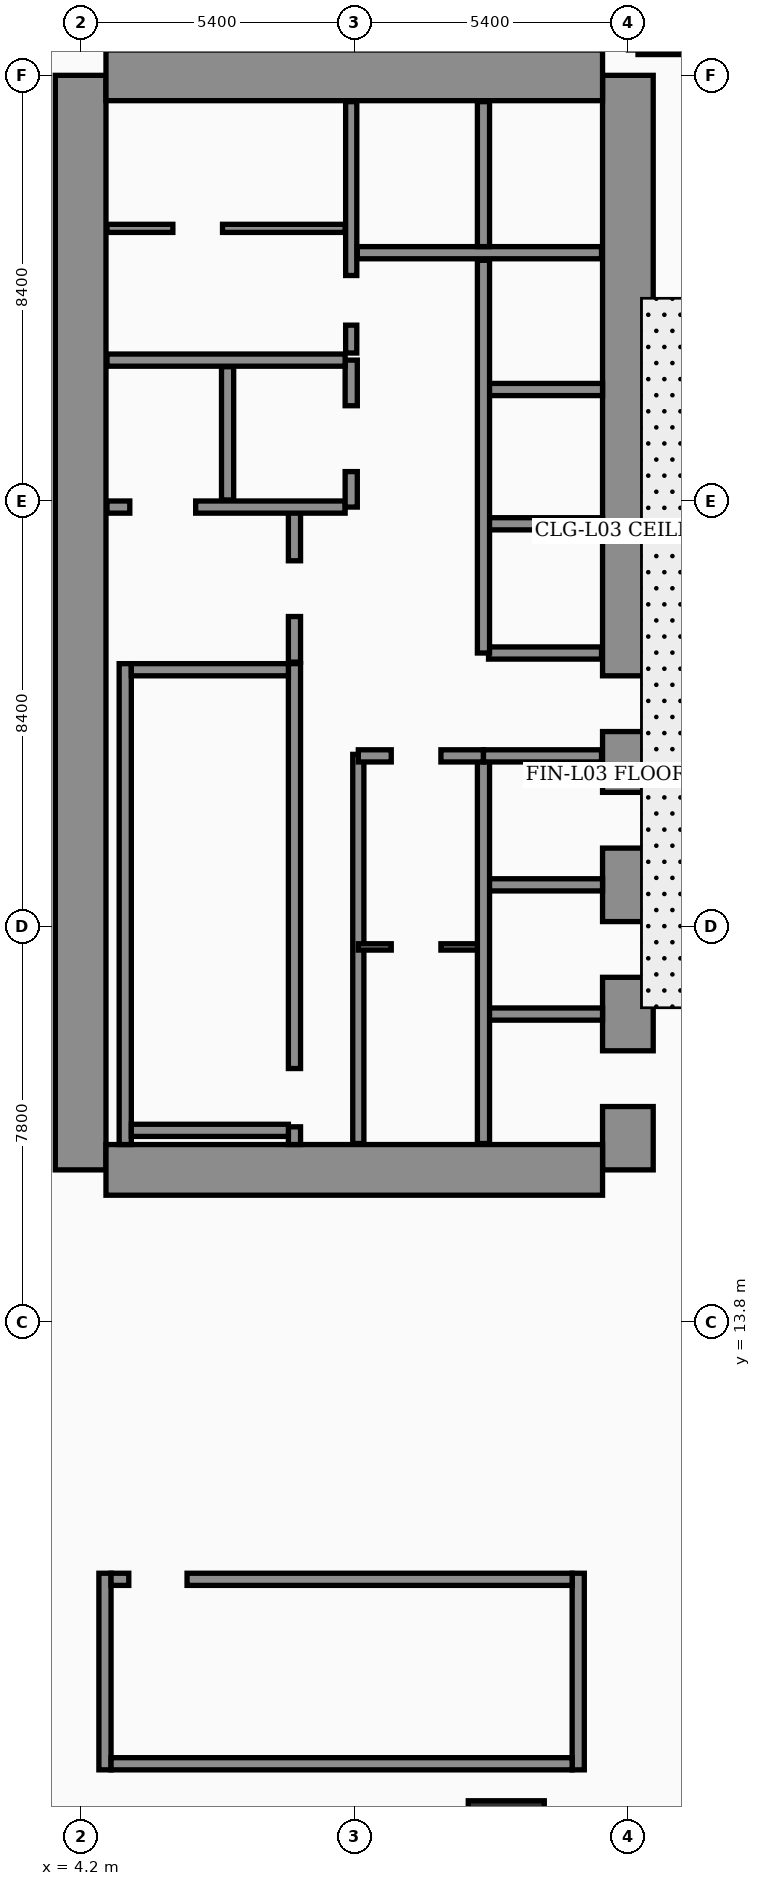
"""IFC4 building model, lengths in metres.
Left out: names, types, materials, properties, quantities, classifications, styles, units other than length and angle.
Written with IfcOpenShell. Run it as: python <this file> out.ifc"""

import sys

from ifc_helpers import new_model, si_unit, direction, frame, frame_2d, origin, origin_2d, place, context, subcontext, project, spatial, rectangle, extrude, element, fill, save


model = new_model("IFC4")
c1 = context("Model", 3, precision=1e-05, world=origin(), true_north=direction((0.0, 1.0)))
c2 = subcontext(c1, "Body", "Model", "MODEL_VIEW")
j1 = project(units=[si_unit("LENGTHUNIT", "METRE"), si_unit("PLANEANGLEUNIT", "RADIAN")], contexts=[c1])
p1 = place(None, origin())
s1 = spatial("IfcSite", under=j1, at=p1, CompositionType="ELEMENT")
p2 = place(p1, origin())
s2 = spatial("IfcBuilding", under=s1, at=p2, CompositionType="ELEMENT")
p3 = place(p2, frame((0.0, 0.0, 17.0)))
s3 = spatial("IfcBuildingStorey", under=s2, at=p3, CompositionType="ELEMENT", Elevation=17.0)
p4 = place(p3, frame((4.2, 16.8, 0.0), z_axis=(0.0, 0.0, 1.0), x_axis=(0.0, 1.0, 0.0)))
e1 = element("IfcWall", 1, at=p4, inside=s3, PredefinedType="SHEAR", context=c2, shape_type="SweptSolid", body=[
    extrude(rectangle(XDim=21.6, YDim=1.0, at=frame_2d((10.8, 0.0))), origin(), (0.0, 0.0, 1.0), 4.55),
])
p5 = place(p3, frame((15.0, 16.8, 0.0), z_axis=(0.0, 0.0, 1.0), x_axis=(0.0, 1.0, 0.0)))
e2 = element("IfcWall", 2, at=p5, inside=s3, PredefinedType="SHEAR", context=c2, shape_type="SweptSolid", body=[
    extrude(rectangle(XDim=21.6, YDim=1.0, at=frame_2d((10.8, 0.0))), origin(), (0.0, 0.0, 1.0), 4.55),
])
p6 = place(p5, frame((8.65, 0.0, 0.0)))
e3 = element("IfcOpeningElement", 3, at=p6, cuts=e2, PredefinedType="OPENING", context=c2, shape_type="SweptSolid", body=[
    extrude(rectangle(XDim=1.1, YDim=2.2, at=frame_2d((0.55, 1.1))), frame((0.0, 0.51, 0.0), z_axis=(0.0, -1.0, 0.0), x_axis=(1.0, 0.0, 0.0)), (0.0, 0.0, 1.0), 1.02),
])
p7 = place(p5, frame((1.25, 0.0, 0.0)))
e4 = element("IfcOpeningElement", 4, at=p7, cuts=e2, PredefinedType="OPENING", context=c2, shape_type="SweptSolid", body=[
    extrude(rectangle(XDim=1.1, YDim=2.2, at=frame_2d((0.55, 1.1))), frame((0.0, 0.51, 0.0), z_axis=(0.0, -1.0, 0.0), x_axis=(1.0, 0.0, 0.0)), (0.0, 0.0, 1.0), 1.02),
])
p8 = place(p5, frame((3.8, 0.0, 0.0)))
e5 = element("IfcOpeningElement", 5, at=p8, cuts=e2, PredefinedType="OPENING", context=c2, shape_type="SweptSolid", body=[
    extrude(rectangle(XDim=1.1, YDim=2.2, at=frame_2d((0.55, 1.1))), frame((0.0, 0.51, 0.0), z_axis=(0.0, -1.0, 0.0), x_axis=(1.0, 0.0, 0.0)), (0.0, 0.0, 1.0), 1.02),
])
p9 = place(p5, frame((6.35, 0.0, 0.0)))
e6 = element("IfcOpeningElement", 6, at=p9, cuts=e2, PredefinedType="OPENING", context=c2, shape_type="SweptSolid", body=[
    extrude(rectangle(XDim=1.1, YDim=2.2, at=frame_2d((0.55, 1.1))), frame((0.0, 0.51, 0.0), z_axis=(0.0, -1.0, 0.0), x_axis=(1.0, 0.0, 0.0)), (0.0, 0.0, 1.0), 1.02),
])
for number, where, z_axis, x_axis in (
    (7, (4.7, 38.4, 0.0), (0.0, 0.0, 1.0), (1.0, 0.0, 0.0)),
    (8, (4.7, 16.8, 0.0), (0.0, 0.0, 1.0), (1.0, 0.0, 0.0)),
):
    element("IfcWall", number, at=place(p3, frame(where, z_axis=z_axis, x_axis=x_axis)), inside=s3, PredefinedType="SHEAR", context=c2, shape_type="SweptSolid", body=[
        extrude(rectangle(XDim=9.8, YDim=1.0, at=frame_2d((4.9, 0.0))), origin(), (0.0, 0.0, 1.0), 4.55),
    ])
p10 = place(p3, frame((5.08, 17.3, 0.0), z_axis=(0.0, 0.0, 1.0), x_axis=(0.0, 1.0, 0.0)))
e9 = element("IfcWall", 9, at=p10, inside=s3, PredefinedType="SOLIDWALL", context=c2, shape_type="SweptSolid", body=[
    extrude(rectangle(XDim=9.49, YDim=0.24, at=frame_2d((4.745, 0.0))), origin(), (0.0, 0.0, 1.0), 4.55),
])
p11 = place(p3, frame((8.42, 17.3, 0.0), z_axis=(0.0, 0.0, 1.0), x_axis=(0.0, 1.0, 0.0)))
e10 = element("IfcWall", 10, at=p11, inside=s3, PredefinedType="SOLIDWALL", context=c2, shape_type="SweptSolid", body=[
    extrude(rectangle(XDim=9.49, YDim=0.24, at=frame_2d((4.745, 0.0))), origin(), (0.0, 0.0, 1.0), 4.55),
])
p12 = place(p11, frame((0.35, 0.0, 0.0)))
e11 = element("IfcOpeningElement", 11, at=p12, cuts=e10, PredefinedType="OPENING", context=c2, shape_type="SweptSolid", body=[
    extrude(rectangle(XDim=1.15, YDim=2.2, at=frame_2d((0.575, 1.1))), frame((0.0, 0.13, 0.0), z_axis=(0.0, -1.0, 0.0), x_axis=(1.0, 0.0, 0.0)), (0.0, 0.0, 1.0), 0.26),
])
for number, where, z_axis, x_axis in (
    (12, (5.2, 17.58, 0.0), (0.0, 0.0, 1.0), (1.0, 0.0, 0.0)),
    (13, (5.2, 26.67, 0.0), (0.0, 0.0, 1.0), (1.0, 0.0, 0.0)),
):
    element("IfcWall", number, at=place(p3, frame(where, z_axis=z_axis, x_axis=x_axis)), inside=s3, PredefinedType="SOLIDWALL", context=c2, shape_type="SweptSolid", body=[
        extrude(rectangle(XDim=3.1, YDim=0.24, at=frame_2d((1.55, 0.0))), origin(), (0.0, 0.0, 1.0), 4.55),
    ])
for number, where, z_axis, x_axis in (
    (14, (4.68, 4.96, 0.0), (0.0, 0.0, 1.0), (0.0, 1.0, 0.0)),
    (15, (14.02, 4.96, 0.0), (0.0, 0.0, 1.0), (0.0, 1.0, 0.0)),
):
    element("IfcWall", number, at=place(p3, frame(where, z_axis=z_axis, x_axis=x_axis)), inside=s3, PredefinedType="SOLIDWALL", context=c2, shape_type="SweptSolid", body=[
        extrude(rectangle(XDim=3.88, YDim=0.24, at=frame_2d((1.94, 0.0))), origin(), (0.0, 0.0, 1.0), 4.55),
    ])
p13 = place(p3, frame((4.8, 5.08, 0.0), z_axis=(0.0, 0.0, 1.0), x_axis=(1.0, 0.0, 0.0)))
e16 = element("IfcWall", 16, at=p13, inside=s3, PredefinedType="SOLIDWALL", context=c2, shape_type="SweptSolid", body=[
    extrude(rectangle(XDim=9.1, YDim=0.24, at=frame_2d((4.55, 0.0))), origin(), (0.0, 0.0, 1.0), 4.55),
])
p14 = place(p3, frame((4.8, 8.72, 0.0), z_axis=(0.0, 0.0, 1.0), x_axis=(1.0, 0.0, 0.0)))
e17 = element("IfcWall", 17, at=p14, inside=s3, PredefinedType="SOLIDWALL", context=c2, shape_type="SweptSolid", body=[
    extrude(rectangle(XDim=9.1, YDim=0.24, at=frame_2d((4.55, 0.0))), origin(), (0.0, 0.0, 1.0), 4.55),
])
p15 = place(p14, frame((0.35, 0.0, 0.0)))
e18 = element("IfcOpeningElement", 18, at=p15, cuts=e17, PredefinedType="OPENING", context=c2, shape_type="SweptSolid", body=[
    extrude(rectangle(XDim=1.15, YDim=2.2, at=frame_2d((0.575, 1.1))), frame((0.0, 0.13, 0.0), z_axis=(0.0, -1.0, 0.0), x_axis=(1.0, 0.0, 0.0)), (0.0, 0.0, 1.0), 0.26),
])
for number, where, z_axis, x_axis in (
    (19, (12.18, 19.875, 0.0), (0.0, 0.0, 1.0), (1.0, 0.0, 0.0)),
    (20, (12.18, 22.425, 0.0), (0.0, 0.0, 1.0), (1.0, 0.0, 0.0)),
    (21, (12.18, 29.55, 0.0), (0.0, 0.0, 1.0), (1.0, 0.0, 0.0)),
    (22, (12.18, 32.2, 0.0), (0.0, 0.0, 1.0), (1.0, 0.0, 0.0)),
):
    element("IfcWall", number, at=place(p3, frame(where, z_axis=z_axis, x_axis=x_axis)), inside=s3, PredefinedType="SOLIDWALL", context=c2, shape_type="SweptSolid", body=[
        extrude(rectangle(XDim=2.32, YDim=0.24, at=frame_2d((1.16, 0.0))), origin(), (0.0, 0.0, 1.0), 4.55),
    ])
p16 = place(p3, frame((12.6, 3.6, 0.0), z_axis=(0.0, 0.0, 1.0), x_axis=(1.0, 0.0, 0.0)))
e23 = element("IfcColumn", 23, at=p16, inside=s3, PredefinedType="COLUMN", context=c2, shape_type="SweptSolid", body=[
    extrude(rectangle(XDim=1.5, YDim=1.5, at=origin_2d()), origin(), (0.0, 0.0, 1.0), 4.55),
])
p17 = place(p3, frame((8.42, 26.82, 0.0), z_axis=(0.0, 0.0, 1.0), x_axis=(0.0, 1.0, 0.0)))
e24 = element("IfcWall", 24, at=p17, inside=s3, PredefinedType="SOLIDWALL", context=c2, shape_type="SweptSolid", body=[
    extrude(rectangle(XDim=3.0, YDim=0.24, at=frame_2d((1.5, 0.0))), origin(), (0.0, 0.0, 1.0), 4.55),
])
p18 = place(p17, frame((0.9, 0.0, 0.0)))
e25 = element("IfcOpeningElement", 25, at=p18, cuts=e24, PredefinedType="OPENING", context=c2, shape_type="SweptSolid", body=[
    extrude(rectangle(XDim=1.1, YDim=2.2, at=frame_2d((0.55, 1.1))), frame((0.0, 0.13, 0.0), z_axis=(0.0, -1.0, 0.0), x_axis=(1.0, 0.0, 0.0)), (0.0, 0.0, 1.0), 0.26),
])
p19 = place(p3, frame((4.72, 29.88, 0.0), z_axis=(0.0, 0.0, 1.0), x_axis=(1.0, 0.0, 0.0)))
e26 = element("IfcWall", 26, at=p19, inside=s3, PredefinedType="SOLIDWALL", context=c2, shape_type="SweptSolid", body=[
    extrude(rectangle(XDim=4.7, YDim=0.24, at=frame_2d((2.35, 0.0))), origin(), (0.0, 0.0, 1.0), 4.55),
])
p20 = place(p19, frame((0.45, 0.0, 0.0)))
e27 = element("IfcOpeningElement", 27, at=p20, cuts=e26, PredefinedType="OPENING", context=c2, shape_type="SweptSolid", body=[
    extrude(rectangle(XDim=1.3, YDim=2.35, at=frame_2d((0.65, 1.175))), frame((0.0, 0.13, 0.0), z_axis=(0.0, -1.0, 0.0), x_axis=(1.0, 0.0, 0.0)), (0.0, 0.0, 1.0), 0.26),
])
p21 = place(p3, frame((7.1, 30.02, 0.0), z_axis=(0.0, 0.0, 1.0), x_axis=(0.0, 1.0, 0.0)))
e28 = element("IfcWall", 28, at=p21, inside=s3, PredefinedType="SOLIDWALL", context=c2, shape_type="SweptSolid", body=[
    extrude(rectangle(XDim=2.63, YDim=0.24, at=frame_2d((1.315, 0.0))), origin(), (0.0, 0.0, 1.0), 4.55),
])
p22 = place(p3, frame((9.54, 29.88, 0.0), z_axis=(0.0, 0.0, 1.0), x_axis=(0.0, 1.0, 0.0)))
e29 = element("IfcWall", 29, at=p22, inside=s3, PredefinedType="SOLIDWALL", context=c2, shape_type="SweptSolid", body=[
    extrude(rectangle(XDim=2.9, YDim=0.24, at=frame_2d((1.45, 0.0))), origin(), (0.0, 0.0, 1.0), 4.55),
])
p23 = place(p22, frame((0.7, 0.0, 0.0)))
e30 = element("IfcOpeningElement", 30, at=p23, cuts=e29, PredefinedType="OPENING", context=c2, shape_type="SweptSolid", body=[
    extrude(rectangle(XDim=1.3, YDim=2.35, at=frame_2d((0.65, 1.175))), frame((0.0, 0.13, 0.0), z_axis=(0.0, -1.0, 0.0), x_axis=(1.0, 0.0, 0.0)), (0.0, 0.0, 1.0), 0.26),
])
p24 = place(p3, frame((4.72, 32.78, 0.0), z_axis=(0.0, 0.0, 1.0), x_axis=(1.0, 0.0, 0.0)))
e31 = element("IfcWall", 31, at=p24, inside=s3, PredefinedType="SOLIDWALL", context=c2, shape_type="SweptSolid", body=[
    extrude(rectangle(XDim=4.7, YDim=0.24, at=frame_2d((2.35, 0.0))), origin(), (0.0, 0.0, 1.0), 4.55),
])
p25 = place(p3, frame((9.68, 17.32, 0.0), z_axis=(0.0, 0.0, 1.0), x_axis=(0.0, 1.0, 0.0)))
e32 = element("IfcWall", 32, at=p25, inside=s3, PredefinedType="SOLIDWALL", context=c2, shape_type="SweptSolid", body=[
    extrude(rectangle(XDim=7.68, YDim=0.22, at=frame_2d((3.84, 0.0))), origin(), (0.0, 0.0, 1.0), 4.55),
])
p26 = place(p3, frame((4.72, 35.38, 0.0), z_axis=(0.0, 0.0, 1.0), x_axis=(1.0, 0.0, 0.0)))
e33 = element("IfcWall", 33, at=p26, inside=s3, PredefinedType="PARTITIONING", context=c2, shape_type="SweptSolid", body=[
    extrude(rectangle(XDim=4.7, YDim=0.16, at=frame_2d((2.35, 0.0))), origin(), (0.0, 0.0, 1.0), 4.55),
])
p27 = place(p26, frame((1.3, 0.0, 0.0)))
e34 = element("IfcOpeningElement", 34, at=p27, cuts=e33, PredefinedType="OPENING", context=c2, shape_type="SweptSolid", body=[
    extrude(rectangle(XDim=0.98, YDim=2.15, at=frame_2d((0.49, 1.075))), frame((0.0, 0.09, 0.0), z_axis=(0.0, -1.0, 0.0), x_axis=(1.0, 0.0, 0.0)), (0.0, 0.0, 1.0), 0.18),
])
p28 = place(p3, frame((9.54, 32.92, 0.0), z_axis=(0.0, 0.0, 1.0), x_axis=(0.0, 1.0, 0.0)))
e35 = element("IfcWall", 35, at=p28, inside=s3, PredefinedType="SOLIDWALL", context=c2, shape_type="SweptSolid", body=[
    extrude(rectangle(XDim=4.96, YDim=0.22, at=frame_2d((2.48, 0.0))), origin(), (0.0, 0.0, 1.0), 4.55),
])
p29 = place(p28, frame((0.55, 0.0, 0.0)))
e36 = element("IfcOpeningElement", 36, at=p29, cuts=e35, PredefinedType="OPENING", context=c2, shape_type="SweptSolid", body=[
    extrude(rectangle(XDim=0.98, YDim=2.15, at=frame_2d((0.49, 1.075))), frame((0.0, 0.12, 0.0), z_axis=(0.0, -1.0, 0.0), x_axis=(1.0, 0.0, 0.0)), (0.0, 0.0, 1.0), 0.24),
])
p30 = place(p3, frame((9.68, 21.2, 0.0), z_axis=(0.0, 0.0, 1.0), x_axis=(1.0, 0.0, 0.0)))
e37 = element("IfcWall", 37, at=p30, inside=s3, PredefinedType="PARTITIONING", context=c2, shape_type="SweptSolid", body=[
    extrude(rectangle(XDim=2.47, YDim=0.125, at=frame_2d((1.235, 0.0))), origin(), (0.0, 0.0, 1.0), 4.55),
])
p31 = place(p30, frame((0.65, 0.0, 0.0)))
e38 = element("IfcOpeningElement", 38, at=p31, cuts=e37, PredefinedType="OPENING", context=c2, shape_type="SweptSolid", body=[
    extrude(rectangle(XDim=0.98, YDim=2.15, at=frame_2d((0.49, 1.075))), frame((0.0, 0.073, 0.0), z_axis=(0.0, -1.0, 0.0), x_axis=(1.0, 0.0, 0.0)), (0.0, 0.0, 1.0), 0.145),
])
p32 = place(p3, frame((12.15, 17.32, 0.0), z_axis=(0.0, 0.0, 1.0), x_axis=(0.0, 1.0, 0.0)))
e39 = element("IfcWall", 39, at=p32, inside=s3, PredefinedType="SOLIDWALL", context=c2, shape_type="SweptSolid", body=[
    extrude(rectangle(XDim=7.65, YDim=0.24, at=frame_2d((3.825, 0.0))), origin(), (0.0, 0.0, 1.0), 4.55),
])
p33 = place(p3, frame((9.68, 24.97, 0.0), z_axis=(0.0, 0.0, 1.0), x_axis=(1.0, 0.0, 0.0)))
e40 = element("IfcWall", 40, at=p33, inside=s3, PredefinedType="SOLIDWALL", context=c2, shape_type="SweptSolid", body=[
    extrude(rectangle(XDim=2.47, YDim=0.24, at=frame_2d((1.235, 0.0))), origin(), (0.0, 0.0, 1.0), 4.55),
])
p34 = place(p33, frame((0.65, 0.0, 0.0)))
e41 = element("IfcOpeningElement", 41, at=p34, cuts=e40, PredefinedType="OPENING", context=c2, shape_type="SweptSolid", body=[
    extrude(rectangle(XDim=0.98, YDim=2.15, at=frame_2d((0.49, 1.075))), frame((0.0, 0.13, 0.0), z_axis=(0.0, -1.0, 0.0), x_axis=(1.0, 0.0, 0.0)), (0.0, 0.0, 1.0), 0.26),
])
p35 = place(p3, frame((12.15, 24.97, 0.0), z_axis=(0.0, 0.0, 1.0), x_axis=(1.0, 0.0, 0.0)))
e42 = element("IfcWall", 42, at=p35, inside=s3, PredefinedType="SOLIDWALL", context=c2, shape_type="SweptSolid", body=[
    extrude(rectangle(XDim=2.33, YDim=0.24, at=frame_2d((1.165, 0.0))), origin(), (0.0, 0.0, 1.0), 3.75),
])
p36 = place(p3, frame((12.25, 27.0, 0.0), z_axis=(0.0, 0.0, 1.0), x_axis=(1.0, 0.0, 0.0)))
e43 = element("IfcWall", 43, at=p36, inside=s3, PredefinedType="SOLIDWALL", context=c2, shape_type="SweptSolid", body=[
    extrude(rectangle(XDim=2.23, YDim=0.24, at=frame_2d((1.115, 0.0))), origin(), (0.0, 0.0, 1.0), 4.55),
])
p37 = place(p3, frame((12.15, 27.0, 0.0), z_axis=(0.0, 0.0, 1.0), x_axis=(0.0, 1.0, 0.0)))
e44 = element("IfcWall", 44, at=p37, inside=s3, PredefinedType="SOLIDWALL", context=c2, shape_type="SweptSolid", body=[
    extrude(rectangle(XDim=7.75, YDim=0.24, at=frame_2d((3.875, 0.0))), origin(), (0.0, 0.0, 1.0), 4.55),
])
p38 = place(p3, frame((9.66, 34.9, 0.0), z_axis=(0.0, 0.0, 1.0), x_axis=(1.0, 0.0, 0.0)))
e45 = element("IfcWall", 45, at=p38, inside=s3, PredefinedType="SOLIDWALL", context=c2, shape_type="SweptSolid", body=[
    extrude(rectangle(XDim=4.82, YDim=0.24, at=frame_2d((2.41, 0.0))), origin(), (0.0, 0.0, 1.0), 4.55),
])
p39 = place(p3, frame((12.15, 35.02, 0.0), z_axis=(0.0, 0.0, 1.0), x_axis=(0.0, 1.0, 0.0)))
e46 = element("IfcWall", 46, at=p39, inside=s3, PredefinedType="SOLIDWALL", context=c2, shape_type="SweptSolid", body=[
    extrude(rectangle(XDim=2.86, YDim=0.24, at=frame_2d((1.43, 0.0))), origin(), (0.0, 0.0, 1.0), 4.55),
])
p40 = place(p3, frame((15.2, 38.9, 0.0), z_axis=(0.0, 0.0, 1.0), x_axis=(1.0, 0.0, 0.0)))
e47 = element("IfcWall", 47, at=p40, inside=s3, PredefinedType="PARTITIONING", context=c2, shape_type="SweptSolid", body=[
    extrude(rectangle(XDim=18.1, YDim=0.18, at=frame_2d((9.05, 0.0))), origin(), (0.0, 0.0, 1.0), 3.75),
])
p41 = place(p40, frame((2.2, 0.0, 0.0)))
e48 = element("IfcOpeningElement", 48, at=p41, cuts=e47, PredefinedType="OPENING", context=c2, shape_type="SweptSolid", body=[
    extrude(rectangle(XDim=1.02, YDim=2.2, at=frame_2d((0.51, 1.1))), frame((0.0, 0.1, 0.0), z_axis=(0.0, -1.0, 0.0), x_axis=(1.0, 0.0, 0.0)), (0.0, 0.0, 1.0), 0.2),
])
p42 = place(p40, frame((8.2, 0.0, 0.0)))
e49 = element("IfcOpeningElement", 49, at=p42, cuts=e47, PredefinedType="OPENING", context=c2, shape_type="SweptSolid", body=[
    extrude(rectangle(XDim=1.02, YDim=2.2, at=frame_2d((0.51, 1.1))), frame((0.0, 0.1, 0.0), z_axis=(0.0, -1.0, 0.0), x_axis=(1.0, 0.0, 0.0)), (0.0, 0.0, 1.0), 0.2),
])
p43 = place(p40, frame((14.2, 0.0, 0.0)))
e50 = element("IfcOpeningElement", 50, at=p43, cuts=e47, PredefinedType="OPENING", context=c2, shape_type="SweptSolid", body=[
    extrude(rectangle(XDim=1.02, YDim=2.2, at=frame_2d((0.51, 1.1))), frame((0.0, 0.1, 0.0), z_axis=(0.0, -1.0, 0.0), x_axis=(1.0, 0.0, 0.0)), (0.0, 0.0, 1.0), 0.2),
])
p44 = place(p18, origin())
e51 = element("IfcDoor", 51, at=p44, inside=s3, OperationType="SINGLE_SWING_RIGHT", PredefinedType="DOOR", context=c2, shape_type="SweptSolid", body=[
    extrude(rectangle(XDim=1.1, YDim=2.2, at=frame_2d((0.55, 1.1))), frame((0.0, 0.025, 0.0), z_axis=(0.0, -1.0, 0.0), x_axis=(1.0, 0.0, 0.0)), (0.0, 0.0, 1.0), 0.05),
])
fill(e25, e51)
p45 = place(p20, origin())
e52 = element("IfcDoor", 52, at=p45, inside=s3, OperationType="DOUBLE_DOOR_SLIDING", PredefinedType="DOOR", context=c2, shape_type="SweptSolid", body=[
    extrude(rectangle(XDim=1.3, YDim=2.35, at=frame_2d((0.65, 1.175))), frame((0.0, 0.025, 0.0), z_axis=(0.0, -1.0, 0.0), x_axis=(1.0, 0.0, 0.0)), (0.0, 0.0, 1.0), 0.05),
])
fill(e27, e52)
p46 = place(p23, origin())
e53 = element("IfcDoor", 53, at=p46, inside=s3, OperationType="DOUBLE_DOOR_SLIDING", PredefinedType="DOOR", context=c2, shape_type="SweptSolid", body=[
    extrude(rectangle(XDim=1.3, YDim=2.35, at=frame_2d((0.65, 1.175))), frame((0.0, 0.025, 0.0), z_axis=(0.0, -1.0, 0.0), x_axis=(1.0, 0.0, 0.0)), (0.0, 0.0, 1.0), 0.05),
])
fill(e30, e53)
p47 = place(p27, origin())
e54 = element("IfcDoor", 54, at=p47, inside=s3, OperationType="SINGLE_SWING_RIGHT", PredefinedType="DOOR", context=c2, shape_type="SweptSolid", body=[
    extrude(rectangle(XDim=0.98, YDim=2.15, at=frame_2d((0.49, 1.075))), frame((0.0, 0.025, 0.0), z_axis=(0.0, -1.0, 0.0), x_axis=(1.0, 0.0, 0.0)), (0.0, 0.0, 1.0), 0.05),
])
fill(e34, e54)
p48 = place(p29, origin())
e55 = element("IfcDoor", 55, at=p48, inside=s3, OperationType="SINGLE_SWING_LEFT", PredefinedType="DOOR", context=c2, shape_type="SweptSolid", body=[
    extrude(rectangle(XDim=0.98, YDim=2.15, at=frame_2d((0.49, 1.075))), frame((0.0, 0.025, 0.0), z_axis=(0.0, -1.0, 0.0), x_axis=(1.0, 0.0, 0.0)), (0.0, 0.0, 1.0), 0.05),
])
fill(e36, e55)
p49 = place(p31, origin())
e56 = element("IfcDoor", 56, at=p49, inside=s3, OperationType="SINGLE_SWING_LEFT", PredefinedType="DOOR", context=c2, shape_type="SweptSolid", body=[
    extrude(rectangle(XDim=0.98, YDim=2.15, at=frame_2d((0.49, 1.075))), frame((0.0, 0.025, 0.0), z_axis=(0.0, -1.0, 0.0), x_axis=(1.0, 0.0, 0.0)), (0.0, 0.0, 1.0), 0.05),
])
fill(e38, e56)
p50 = place(p34, origin())
e57 = element("IfcDoor", 57, at=p50, inside=s3, OperationType="SINGLE_SWING_LEFT", PredefinedType="DOOR", context=c2, shape_type="SweptSolid", body=[
    extrude(rectangle(XDim=0.98, YDim=2.15, at=frame_2d((0.49, 1.075))), frame((0.0, 0.025, 0.0), z_axis=(0.0, -1.0, 0.0), x_axis=(1.0, 0.0, 0.0)), (0.0, 0.0, 1.0), 0.05),
])
fill(e41, e57)
p51 = place(p12, origin())
e58 = element("IfcDoor", 58, at=p51, inside=s3, OperationType="SINGLE_SWING_LEFT", PredefinedType="DOOR", context=c2, shape_type="SweptSolid", body=[
    extrude(rectangle(XDim=1.15, YDim=2.2, at=frame_2d((0.575, 1.1))), frame((0.0, 0.025, 0.0), z_axis=(0.0, -1.0, 0.0), x_axis=(1.0, 0.0, 0.0)), (0.0, 0.0, 1.0), 0.05),
])
fill(e11, e58)
p52 = place(p15, origin())
e59 = element("IfcDoor", 59, at=p52, inside=s3, OperationType="SINGLE_SWING_RIGHT", PredefinedType="DOOR", context=c2, shape_type="SweptSolid", body=[
    extrude(rectangle(XDim=1.15, YDim=2.2, at=frame_2d((0.575, 1.1))), frame((0.0, 0.025, 0.0), z_axis=(0.0, -1.0, 0.0), x_axis=(1.0, 0.0, 0.0)), (0.0, 0.0, 1.0), 0.05),
])
fill(e18, e59)
p53 = place(p6, origin())
e60 = element("IfcDoor", 60, at=p53, inside=s3, OperationType="SINGLE_SWING_RIGHT", PredefinedType="DOOR", context=c2, shape_type="SweptSolid", body=[
    extrude(rectangle(XDim=1.1, YDim=2.2, at=frame_2d((0.55, 1.1))), frame((0.0, 0.025, 0.0), z_axis=(0.0, -1.0, 0.0), x_axis=(1.0, 0.0, 0.0)), (0.0, 0.0, 1.0), 0.05),
])
fill(e3, e60)
p54 = place(p7, origin())
e61 = element("IfcDoor", 61, at=p54, inside=s3, OperationType="DOUBLE_DOOR_SLIDING", PredefinedType="DOOR", context=c2, shape_type="SweptSolid", body=[
    extrude(rectangle(XDim=1.1, YDim=2.2, at=frame_2d((0.55, 1.1))), frame((0.0, 0.025, 0.0), z_axis=(0.0, -1.0, 0.0), x_axis=(1.0, 0.0, 0.0)), (0.0, 0.0, 1.0), 0.05),
])
fill(e4, e61)
p55 = place(p8, origin())
e62 = element("IfcDoor", 62, at=p55, inside=s3, OperationType="DOUBLE_DOOR_SLIDING", PredefinedType="DOOR", context=c2, shape_type="SweptSolid", body=[
    extrude(rectangle(XDim=1.1, YDim=2.2, at=frame_2d((0.55, 1.1))), frame((0.0, 0.025, 0.0), z_axis=(0.0, -1.0, 0.0), x_axis=(1.0, 0.0, 0.0)), (0.0, 0.0, 1.0), 0.05),
])
fill(e5, e62)
p56 = place(p9, origin())
e63 = element("IfcDoor", 63, at=p56, inside=s3, OperationType="DOUBLE_DOOR_SLIDING", PredefinedType="DOOR", context=c2, shape_type="SweptSolid", body=[
    extrude(rectangle(XDim=1.1, YDim=2.2, at=frame_2d((0.55, 1.1))), frame((0.0, 0.025, 0.0), z_axis=(0.0, -1.0, 0.0), x_axis=(1.0, 0.0, 0.0)), (0.0, 0.0, 1.0), 0.05),
])
fill(e6, e63)
save(model, sys.argv[1])
